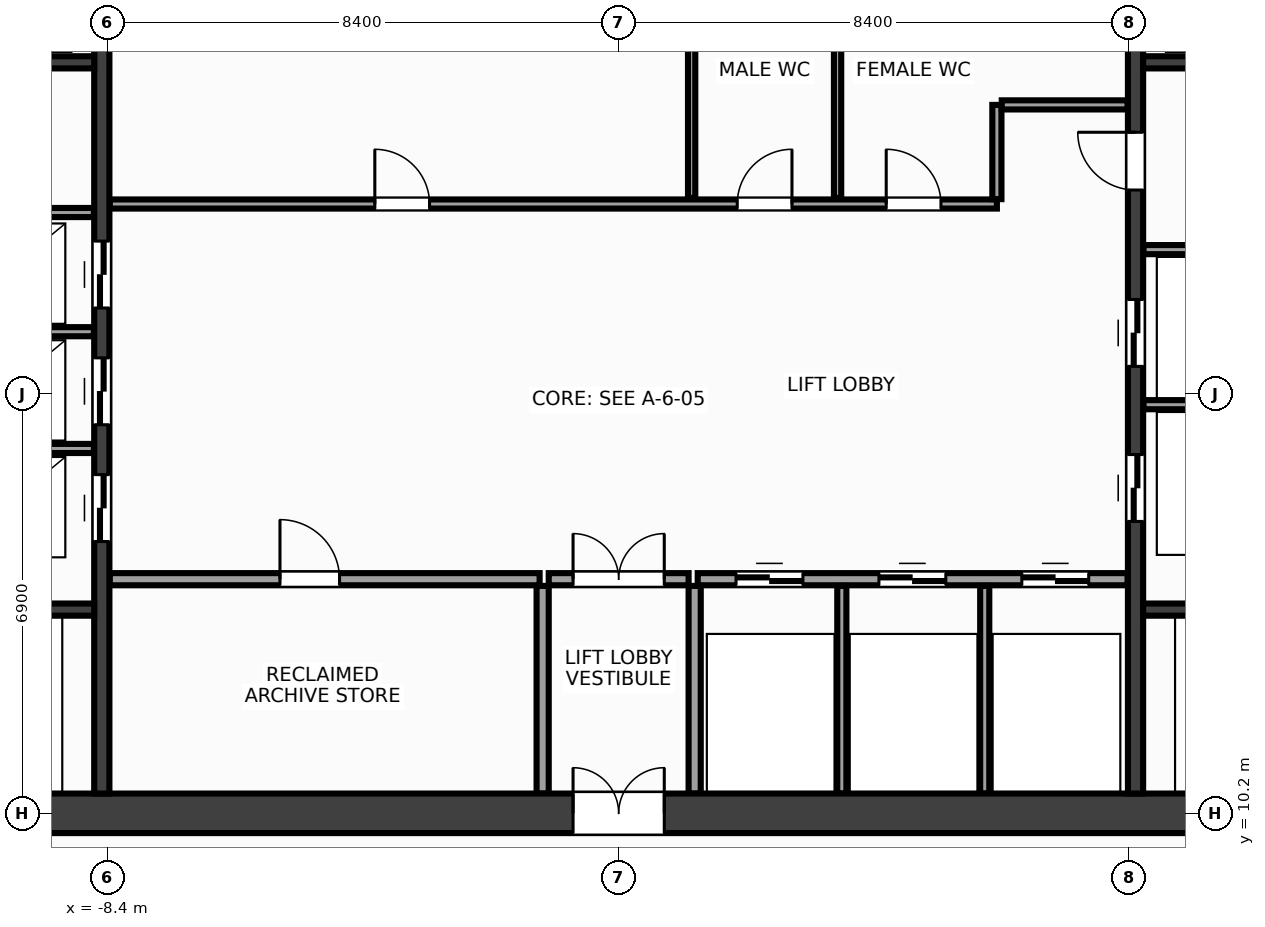
"""IFC4 building model, lengths in metres.
Left out: names, types, materials, properties, quantities, classifications, styles, units other than length and angle.
Written with IfcOpenShell. Run it as: python <this file> out.ifc"""

import sys

from ifc_helpers import new_model, si_unit, direction, frame, frame_2d, origin, place, context, subcontext, project, spatial, rectangle, extrude, source, transform, mapped, element, fill, save


model = new_model("IFC4")
c1 = context("Model", 3, precision=1e-05, world=origin(), true_north=direction((0.0, 1.0)))
c2 = subcontext(c1, "Body", "Model", "MODEL_VIEW")
j1 = project(units=[si_unit("LENGTHUNIT", "METRE"), si_unit("PLANEANGLEUNIT", "RADIAN")], contexts=[c1])
p1 = place(None, origin())
s1 = spatial("IfcSite", under=j1, at=p1, CompositionType="ELEMENT")
p2 = place(p1, origin())
s2 = spatial("IfcBuilding", under=s1, at=p2, CompositionType="ELEMENT")
p3 = place(p2, frame((0.0, 0.0, 131.6)))
s3 = spatial("IfcBuildingStorey", under=s2, at=p3, CompositionType="ELEMENT", Elevation=131.6)
m1 = source(origin(), c2, "Body", "SweptSolid", [
    extrude(rectangle(XDim=31.85, YDim=0.65, at=frame_2d((15.925, 0.0))), origin(), (0.0, 0.0, 1.0), 3.6),
])
p4 = place(p3, frame((-15.925, 10.2, 0.0), z_axis=(0.0, 0.0, 1.0), x_axis=(1.0, 0.0, 0.0)))
e1 = element("IfcWall", 1, at=p4, inside=s3, PredefinedType="SHEAR", context=c2, shape_type="MappedRepresentation", body=[
    mapped(m1, transform((0.0, 0.0, 0.0), x_axis=(1.0, 0.0, 0.0), y_axis=(0.0, 1.0, 0.0), z_axis=(0.0, 0.0, 1.0), scale=1.0)),
])
p5 = place(p4, frame((1.775, 0.0, 0.0)))
e2 = element("IfcOpeningElement", 2, at=p5, cuts=e1, PredefinedType="OPENING", context=c2, shape_type="SweptSolid", body=[
    extrude(rectangle(XDim=1.6, YDim=2.15, at=frame_2d((0.8, 1.075))), frame((0.0, 0.337, 0.0), z_axis=(0.0, -1.0, 0.0), x_axis=(1.0, 0.0, 0.0)), (0.0, 0.0, 1.0), 0.674),
])
p6 = place(p4, frame((28.475, 0.0, 0.0)))
e3 = element("IfcOpeningElement", 3, at=p6, cuts=e1, PredefinedType="OPENING", context=c2, shape_type="SweptSolid", body=[
    extrude(rectangle(XDim=1.6, YDim=2.15, at=frame_2d((0.8, 1.075))), frame((0.0, 0.337, 0.0), z_axis=(0.0, -1.0, 0.0), x_axis=(1.0, 0.0, 0.0)), (0.0, 0.0, 1.0), 0.674),
])
p7 = place(p4, frame((15.175, 0.0, 0.0)))
e4 = element("IfcOpeningElement", 4, at=p7, cuts=e1, PredefinedType="OPENING", context=c2, shape_type="SweptSolid", body=[
    extrude(rectangle(XDim=1.5, YDim=2.2, at=frame_2d((0.75, 1.1))), frame((0.0, 0.337, 0.0), z_axis=(0.0, -1.0, 0.0), x_axis=(1.0, 0.0, 0.0)), (0.0, 0.0, 1.0), 0.674),
])
m2 = source(origin(), c2, "Body", "SweptSolid", [
    extrude(rectangle(XDim=12.95, YDim=0.25, at=frame_2d((6.475, 0.0))), origin(), (0.0, 0.0, 1.0), 3.6),
])
p8 = place(p3, frame((-8.5, 10.525, 0.0), z_axis=(0.0, 0.0, 1.0), x_axis=(0.0, 1.0, 0.0)))
e5 = element("IfcWall", 5, at=p8, inside=s3, PredefinedType="SHEAR", context=c2, shape_type="MappedRepresentation", body=[
    mapped(m2, transform((0.0, 0.0, 0.0), x_axis=(1.0, 0.0, 0.0), y_axis=(0.0, 1.0, 0.0), z_axis=(0.0, 0.0, 1.0), scale=1.0)),
])
p9 = place(p8, frame((4.145, 0.0, 0.0)))
e6 = element("IfcOpeningElement", 6, at=p9, cuts=e5, PredefinedType="OPENING", context=c2, shape_type="SweptSolid", body=[
    extrude(rectangle(XDim=1.1, YDim=2.15, at=frame_2d((0.55, 1.075))), frame((0.0, 0.137, 0.0), z_axis=(0.0, -1.0, 0.0), x_axis=(1.0, 0.0, 0.0)), (0.0, 0.0, 1.0), 0.274),
])
p10 = place(p8, frame((6.065, 0.0, 0.0)))
e7 = element("IfcOpeningElement", 7, at=p10, cuts=e5, PredefinedType="OPENING", context=c2, shape_type="SweptSolid", body=[
    extrude(rectangle(XDim=1.1, YDim=2.15, at=frame_2d((0.55, 1.075))), frame((0.0, 0.137, 0.0), z_axis=(0.0, -1.0, 0.0), x_axis=(1.0, 0.0, 0.0)), (0.0, 0.0, 1.0), 0.274),
])
p11 = place(p8, frame((7.985, 0.0, 0.0)))
e8 = element("IfcOpeningElement", 8, at=p11, cuts=e5, PredefinedType="OPENING", context=c2, shape_type="SweptSolid", body=[
    extrude(rectangle(XDim=1.1, YDim=2.15, at=frame_2d((0.55, 1.075))), frame((0.0, 0.137, 0.0), z_axis=(0.0, -1.0, 0.0), x_axis=(1.0, 0.0, 0.0)), (0.0, 0.0, 1.0), 0.274),
])
p12 = place(p3, frame((8.5, 10.525, 0.0), z_axis=(0.0, 0.0, 1.0), x_axis=(0.0, 1.0, 0.0)))
e9 = element("IfcWall", 9, at=p12, inside=s3, PredefinedType="SHEAR", context=c2, shape_type="MappedRepresentation", body=[
    mapped(m2, transform((0.0, 0.0, 0.0), x_axis=(1.0, 0.0, 0.0), y_axis=(0.0, 1.0, 0.0), z_axis=(0.0, 0.0, 1.0), scale=1.0)),
])
p13 = place(p12, frame((4.475, 0.0, 0.0)))
e10 = element("IfcOpeningElement", 10, at=p13, cuts=e9, PredefinedType="OPENING", context=c2, shape_type="SweptSolid", body=[
    extrude(rectangle(XDim=1.1, YDim=2.15, at=frame_2d((0.55, 1.075))), frame((0.0, 0.137, 0.0), z_axis=(0.0, -1.0, 0.0), x_axis=(1.0, 0.0, 0.0)), (0.0, 0.0, 1.0), 0.274),
])
p14 = place(p12, frame((7.025, 0.0, 0.0)))
e11 = element("IfcOpeningElement", 11, at=p14, cuts=e9, PredefinedType="OPENING", context=c2, shape_type="SweptSolid", body=[
    extrude(rectangle(XDim=1.1, YDim=2.15, at=frame_2d((0.55, 1.075))), frame((0.0, 0.137, 0.0), z_axis=(0.0, -1.0, 0.0), x_axis=(1.0, 0.0, 0.0)), (0.0, 0.0, 1.0), 0.274),
])
p15 = place(p12, frame((9.925, 0.0, 0.0)))
e12 = element("IfcOpeningElement", 12, at=p15, cuts=e9, PredefinedType="OPENING", context=c2, shape_type="SweptSolid", body=[
    extrude(rectangle(XDim=0.95, YDim=2.15, at=frame_2d((0.475, 1.075))), frame((0.0, 0.137, 0.0), z_axis=(0.0, -1.0, 0.0), x_axis=(1.0, 0.0, 0.0)), (0.0, 0.0, 1.0), 0.274),
])
m3 = source(origin(), c2, "Body", "SweptSolid", [
    extrude(rectangle(XDim=2.825, YDim=0.2, at=frame_2d((1.413, 0.0))), origin(), (0.0, 0.0, 1.0), 3.6),
])
for number, where, z_axis, x_axis in (
    (13, (-11.45, 13.55, 0.0), (0.0, 0.0, 1.0), (1.0, 0.0, 0.0)),
    (14, (8.625, 13.55, 0.0), (0.0, 0.0, 1.0), (1.0, 0.0, 0.0)),
):
    element("IfcWall", number, at=place(p3, frame(where, z_axis=z_axis, x_axis=x_axis)), inside=s3, PredefinedType="SHEAR", context=c2, shape_type="MappedRepresentation", body=[
        mapped(m3, transform((0.0, 0.0, 0.0), x_axis=(1.0, 0.0, 0.0), y_axis=(0.0, 1.0, 0.0), z_axis=(0.0, 0.0, 1.0), scale=1.0)),
    ])
m4 = source(origin(), c2, "Body", "SweptSolid", [
    extrude(rectangle(XDim=3.02, YDim=0.2, at=frame_2d((1.51, 0.0))), origin(), (0.0, 0.0, 1.0), 3.6),
])
for number, where, z_axis, x_axis in (
    (15, (-11.645, 22.55, 0.0), (0.0, 0.0, 1.0), (1.0, 0.0, 0.0)),
    (16, (8.625, 22.55, 0.0), (0.0, 0.0, 1.0), (1.0, 0.0, 0.0)),
):
    element("IfcWall", number, at=place(p3, frame(where, z_axis=z_axis, x_axis=x_axis)), inside=s3, PredefinedType="SHEAR", context=c2, shape_type="MappedRepresentation", body=[
        mapped(m4, transform((0.0, 0.0, 0.0), x_axis=(1.0, 0.0, 0.0), y_axis=(0.0, 1.0, 0.0), z_axis=(0.0, 0.0, 1.0), scale=1.0)),
    ])
m5 = source(origin(), c2, "Body", "SweptSolid", [
    extrude(rectangle(XDim=3.01, YDim=0.15, at=frame_2d((1.505, 0.0))), origin(), (0.0, 0.0, 1.0), 3.38),
])
for number, where, z_axis, x_axis in (
    (17, (-11.64, 16.2, 0.0), (0.0, 0.0, 1.0), (1.0, 0.0, 0.0)),
    (18, (-11.64, 18.12, 0.0), (0.0, 0.0, 1.0), (1.0, 0.0, 0.0)),
    (19, (-11.64, 20.08, 0.0), (0.0, 0.0, 1.0), (1.0, 0.0, 0.0)),
    (20, (8.63, 16.92, 0.0), (0.0, 0.0, 1.0), (1.0, 0.0, 0.0)),
    (21, (8.63, 19.47, 0.0), (0.0, 0.0, 1.0), (1.0, 0.0, 0.0)),
):
    element("IfcWall", number, at=place(p3, frame(where, z_axis=z_axis, x_axis=x_axis)), inside=s3, PredefinedType="PARTITIONING", context=c2, shape_type="MappedRepresentation", body=[
        mapped(m5, transform((0.0, 0.0, 0.0), x_axis=(1.0, 0.0, 0.0), y_axis=(0.0, 1.0, 0.0), z_axis=(0.0, 0.0, 1.0), scale=1.0)),
    ])
m6 = source(origin(), c2, "Body", "SweptSolid", [
    extrude(rectangle(XDim=7.07, YDim=0.2, at=frame_2d((3.535, 0.0))), origin(), (0.0, 0.0, 1.0), 3.38),
])
p16 = place(p3, frame((-8.37, 14.05, 0.0), z_axis=(0.0, 0.0, 1.0), x_axis=(1.0, 0.0, 0.0)))
e22 = element("IfcWall", 22, at=p16, inside=s3, PredefinedType="PARTITIONING", context=c2, shape_type="MappedRepresentation", body=[
    mapped(m6, transform((0.0, 0.0, 0.0), x_axis=(1.0, 0.0, 0.0), y_axis=(0.0, 1.0, 0.0), z_axis=(0.0, 0.0, 1.0), scale=1.0)),
])
p17 = place(p16, frame((2.8, 0.0, 0.0)))
e23 = element("IfcOpeningElement", 23, at=p17, cuts=e22, PredefinedType="OPENING", context=c2, shape_type="SweptSolid", body=[
    extrude(rectangle(XDim=0.98, YDim=2.15, at=frame_2d((0.49, 1.075))), frame((0.0, 0.112, 0.0), z_axis=(0.0, -1.0, 0.0), x_axis=(1.0, 0.0, 0.0)), (0.0, 0.0, 1.0), 0.224),
])
p18 = place(p3, frame((1.3, 14.05, 0.0), z_axis=(0.0, 0.0, 1.0), x_axis=(1.0, 0.0, 0.0)))
e24 = element("IfcWall", 24, at=p18, inside=s3, PredefinedType="PARTITIONING", context=c2, shape_type="MappedRepresentation", body=[
    mapped(m6, transform((0.0, 0.0, 0.0), x_axis=(1.0, 0.0, 0.0), y_axis=(0.0, 1.0, 0.0), z_axis=(0.0, 0.0, 1.0), scale=1.0)),
])
p19 = place(p18, frame((0.63, 0.0, 0.0)))
e25 = element("IfcOpeningElement", 25, at=p19, cuts=e24, PredefinedType="OPENING", context=c2, shape_type="SweptSolid", body=[
    extrude(rectangle(XDim=1.1, YDim=2.15, at=frame_2d((0.55, 1.075))), frame((0.0, 0.112, 0.0), z_axis=(0.0, -1.0, 0.0), x_axis=(1.0, 0.0, 0.0)), (0.0, 0.0, 1.0), 0.224),
])
p20 = place(p18, frame((2.98, 0.0, 0.0)))
e26 = element("IfcOpeningElement", 26, at=p20, cuts=e24, PredefinedType="OPENING", context=c2, shape_type="SweptSolid", body=[
    extrude(rectangle(XDim=1.1, YDim=2.15, at=frame_2d((0.55, 1.075))), frame((0.0, 0.112, 0.0), z_axis=(0.0, -1.0, 0.0), x_axis=(1.0, 0.0, 0.0)), (0.0, 0.0, 1.0), 0.224),
])
p21 = place(p18, frame((5.33, 0.0, 0.0)))
e27 = element("IfcOpeningElement", 27, at=p21, cuts=e24, PredefinedType="OPENING", context=c2, shape_type="SweptSolid", body=[
    extrude(rectangle(XDim=1.1, YDim=2.15, at=frame_2d((0.55, 1.075))), frame((0.0, 0.112, 0.0), z_axis=(0.0, -1.0, 0.0), x_axis=(1.0, 0.0, 0.0)), (0.0, 0.0, 1.0), 0.224),
])
m7 = source(origin(), c2, "Body", "SweptSolid", [
    extrude(rectangle(XDim=3.415, YDim=0.2, at=frame_2d((1.708, 0.0))), origin(), (0.0, 0.0, 1.0), 3.38),
])
for number, where, z_axis, x_axis in (
    (28, (-1.25, 10.525, 0.0), (0.0, 0.0, 1.0), (0.0, 1.0, 0.0)),
    (29, (1.25, 10.525, 0.0), (0.0, 0.0, 1.0), (0.0, 1.0, 0.0)),
):
    element("IfcWall", number, at=place(p3, frame(where, z_axis=z_axis, x_axis=x_axis)), inside=s3, PredefinedType="PARTITIONING", context=c2, shape_type="MappedRepresentation", body=[
        mapped(m7, transform((0.0, 0.0, 0.0), x_axis=(1.0, 0.0, 0.0), y_axis=(0.0, 1.0, 0.0), z_axis=(0.0, 0.0, 1.0), scale=1.0)),
    ])
m8 = source(origin(), c2, "Body", "SweptSolid", [
    extrude(rectangle(XDim=2.3, YDim=0.2, at=frame_2d((1.15, 0.0))), origin(), (0.0, 0.0, 1.0), 3.38),
])
p22 = place(p3, frame((-1.15, 14.05, 0.0), z_axis=(0.0, 0.0, 1.0), x_axis=(1.0, 0.0, 0.0)))
e30 = element("IfcWall", 30, at=p22, inside=s3, PredefinedType="PARTITIONING", context=c2, shape_type="MappedRepresentation", body=[
    mapped(m8, transform((0.0, 0.0, 0.0), x_axis=(1.0, 0.0, 0.0), y_axis=(0.0, 1.0, 0.0), z_axis=(0.0, 0.0, 1.0), scale=1.0)),
])
p23 = place(p22, frame((0.4, 0.0, 0.0)))
e31 = element("IfcOpeningElement", 31, at=p23, cuts=e30, PredefinedType="OPENING", context=c2, shape_type="SweptSolid", body=[
    extrude(rectangle(XDim=1.5, YDim=2.2, at=frame_2d((0.75, 1.1))), frame((0.0, 0.112, 0.0), z_axis=(0.0, -1.0, 0.0), x_axis=(1.0, 0.0, 0.0)), (0.0, 0.0, 1.0), 0.224),
])
m9 = source(origin(), c2, "Body", "SweptSolid", [
    extrude(rectangle(XDim=14.59, YDim=0.15, at=frame_2d((7.295, 0.0))), origin(), (0.0, 0.0, 1.0), 3.38),
])
p24 = place(p3, frame((-8.37, 20.22, 0.0), z_axis=(0.0, 0.0, 1.0), x_axis=(1.0, 0.0, 0.0)))
e32 = element("IfcWall", 32, at=p24, inside=s3, PredefinedType="PARTITIONING", context=c2, shape_type="MappedRepresentation", body=[
    mapped(m9, transform((0.0, 0.0, 0.0), x_axis=(1.0, 0.0, 0.0), y_axis=(0.0, 1.0, 0.0), z_axis=(0.0, 0.0, 1.0), scale=1.0)),
])
p25 = place(p24, frame((4.36, 0.0, 0.0)))
e33 = element("IfcOpeningElement", 33, at=p25, cuts=e32, PredefinedType="OPENING", context=c2, shape_type="SweptSolid", body=[
    extrude(rectangle(XDim=0.9, YDim=2.15, at=frame_2d((0.45, 1.075))), frame((0.0, 0.087, 0.0), z_axis=(0.0, -1.0, 0.0), x_axis=(1.0, 0.0, 0.0)), (0.0, 0.0, 1.0), 0.174),
])
p26 = place(p24, frame((10.32, 0.0, 0.0)))
e34 = element("IfcOpeningElement", 34, at=p26, cuts=e32, PredefinedType="OPENING", context=c2, shape_type="SweptSolid", body=[
    extrude(rectangle(XDim=0.9, YDim=2.15, at=frame_2d((0.45, 1.075))), frame((0.0, 0.087, 0.0), z_axis=(0.0, -1.0, 0.0), x_axis=(1.0, 0.0, 0.0)), (0.0, 0.0, 1.0), 0.174),
])
p27 = place(p24, frame((12.77, 0.0, 0.0)))
e35 = element("IfcOpeningElement", 35, at=p27, cuts=e32, PredefinedType="OPENING", context=c2, shape_type="SweptSolid", body=[
    extrude(rectangle(XDim=0.9, YDim=2.15, at=frame_2d((0.45, 1.075))), frame((0.0, 0.087, 0.0), z_axis=(0.0, -1.0, 0.0), x_axis=(1.0, 0.0, 0.0)), (0.0, 0.0, 1.0), 0.174),
])
m10 = source(origin(), c2, "Body", "SweptSolid", [
    extrude(rectangle(XDim=1.55, YDim=0.15, at=frame_2d((0.775, 0.0))), origin(), (0.0, 0.0, 1.0), 3.38),
])
p28 = place(p3, frame((6.22, 20.3, 0.0), z_axis=(0.0, 0.0, 1.0), x_axis=(0.0, 1.0, 0.0)))
e36 = element("IfcWall", 36, at=p28, inside=s3, PredefinedType="PARTITIONING", context=c2, shape_type="MappedRepresentation", body=[
    mapped(m10, transform((0.0, 0.0, 0.0), x_axis=(1.0, 0.0, 0.0), y_axis=(0.0, 1.0, 0.0), z_axis=(0.0, 0.0, 1.0), scale=1.0)),
])
m11 = source(origin(), c2, "Body", "SweptSolid", [
    extrude(rectangle(XDim=2.07, YDim=0.15, at=frame_2d((1.035, 0.0))), origin(), (0.0, 0.0, 1.0), 3.38),
])
p29 = place(p3, frame((6.3, 21.85, 0.0), z_axis=(0.0, 0.0, 1.0), x_axis=(1.0, 0.0, 0.0)))
e37 = element("IfcWall", 37, at=p29, inside=s3, PredefinedType="PARTITIONING", context=c2, shape_type="MappedRepresentation", body=[
    mapped(m11, transform((0.0, 0.0, 0.0), x_axis=(1.0, 0.0, 0.0), y_axis=(0.0, 1.0, 0.0), z_axis=(0.0, 0.0, 1.0), scale=1.0)),
])
m12 = source(origin(), c2, "Body", "SweptSolid", [
    extrude(rectangle(XDim=3.415, YDim=0.15, at=frame_2d((1.708, 0.0))), origin(), (0.0, 0.0, 1.0), 3.38),
])
for number, where, z_axis, x_axis in (
    (38, (3.67, 10.525, 0.0), (0.0, 0.0, 1.0), (0.0, 1.0, 0.0)),
    (39, (6.02, 10.525, 0.0), (0.0, 0.0, 1.0), (0.0, 1.0, 0.0)),
):
    element("IfcWall", number, at=place(p3, frame(where, z_axis=z_axis, x_axis=x_axis)), inside=s3, PredefinedType="PARTITIONING", context=c2, shape_type="MappedRepresentation", body=[
        mapped(m12, transform((0.0, 0.0, 0.0), x_axis=(1.0, 0.0, 0.0), y_axis=(0.0, 1.0, 0.0), z_axis=(0.0, 0.0, 1.0), scale=1.0)),
    ])
m13 = source(origin(), c2, "Body", "SweptSolid", [
    extrude(rectangle(XDim=3.115, YDim=0.12, at=frame_2d((1.558, 0.0))), origin(), (0.0, 0.0, 1.0), 3.38),
])
for number, where, z_axis, x_axis in (
    (40, (1.2, 20.32, 0.0), (0.0, 0.0, 1.0), (0.0, 1.0, 0.0)),
    (41, (3.6, 20.32, 0.0), (0.0, 0.0, 1.0), (0.0, 1.0, 0.0)),
):
    element("IfcWall", number, at=place(p3, frame(where, z_axis=z_axis, x_axis=x_axis)), inside=s3, PredefinedType="PARTITIONING", context=c2, shape_type="MappedRepresentation", body=[
        mapped(m13, transform((0.0, 0.0, 0.0), x_axis=(1.0, 0.0, 0.0), y_axis=(0.0, 1.0, 0.0), z_axis=(0.0, 0.0, 1.0), scale=1.0)),
    ])
m14 = source(origin(), c2, "Body", "SweptSolid", [
    extrude(rectangle(XDim=1.1, YDim=2.15, at=frame_2d((0.55, 1.075))), frame((0.0, 0.025, 0.0), z_axis=(0.0, -1.0, 0.0), x_axis=(1.0, 0.0, 0.0)), (0.0, 0.0, 1.0), 0.05),
])
p30 = place(p9, origin())
e42 = element("IfcDoor", 42, at=p30, inside=s3, OperationType="DOUBLE_DOOR_SLIDING", PredefinedType="DOOR", context=c2, shape_type="MappedRepresentation", body=[
    mapped(m14, transform((0.0, 0.0, 0.0), x_axis=(1.0, 0.0, 0.0), y_axis=(0.0, 1.0, 0.0), z_axis=(0.0, 0.0, 1.0), scale=1.0)),
])
fill(e6, e42)
p31 = place(p10, origin())
e43 = element("IfcDoor", 43, at=p31, inside=s3, OperationType="DOUBLE_DOOR_SLIDING", PredefinedType="DOOR", context=c2, shape_type="MappedRepresentation", body=[
    mapped(m14, transform((0.0, 0.0, 0.0), x_axis=(1.0, 0.0, 0.0), y_axis=(0.0, 1.0, 0.0), z_axis=(0.0, 0.0, 1.0), scale=1.0)),
])
fill(e7, e43)
p32 = place(p11, origin())
e44 = element("IfcDoor", 44, at=p32, inside=s3, OperationType="DOUBLE_DOOR_SLIDING", PredefinedType="DOOR", context=c2, shape_type="MappedRepresentation", body=[
    mapped(m14, transform((0.0, 0.0, 0.0), x_axis=(1.0, 0.0, 0.0), y_axis=(0.0, 1.0, 0.0), z_axis=(0.0, 0.0, 1.0), scale=1.0)),
])
fill(e8, e44)
p33 = place(p13, origin())
e45 = element("IfcDoor", 45, at=p33, inside=s3, OperationType="DOUBLE_DOOR_SLIDING", PredefinedType="DOOR", context=c2, shape_type="MappedRepresentation", body=[
    mapped(m14, transform((0.0, 0.0, 0.0), x_axis=(1.0, 0.0, 0.0), y_axis=(0.0, 1.0, 0.0), z_axis=(0.0, 0.0, 1.0), scale=1.0)),
])
fill(e10, e45)
p34 = place(p14, origin())
e46 = element("IfcDoor", 46, at=p34, inside=s3, OperationType="DOUBLE_DOOR_SLIDING", PredefinedType="DOOR", context=c2, shape_type="MappedRepresentation", body=[
    mapped(m14, transform((0.0, 0.0, 0.0), x_axis=(1.0, 0.0, 0.0), y_axis=(0.0, 1.0, 0.0), z_axis=(0.0, 0.0, 1.0), scale=1.0)),
])
fill(e11, e46)
m15 = source(origin(), c2, "Body", "SweptSolid", [
    extrude(rectangle(XDim=0.95, YDim=2.15, at=frame_2d((0.475, 1.075))), frame((0.0, 0.025, 0.0), z_axis=(0.0, -1.0, 0.0), x_axis=(1.0, 0.0, 0.0)), (0.0, 0.0, 1.0), 0.05),
])
p35 = place(p15, origin())
e47 = element("IfcDoor", 47, at=p35, inside=s3, OperationType="SINGLE_SWING_RIGHT", PredefinedType="DOOR", context=c2, shape_type="MappedRepresentation", body=[
    mapped(m15, transform((0.0, 0.0, 0.0), x_axis=(1.0, 0.0, 0.0), y_axis=(0.0, 1.0, 0.0), z_axis=(0.0, 0.0, 1.0), scale=1.0)),
])
fill(e12, e47)
m16 = source(origin(), c2, "Body", "SweptSolid", [
    extrude(rectangle(XDim=0.98, YDim=2.15, at=frame_2d((0.49, 1.075))), frame((0.0, 0.025, 0.0), z_axis=(0.0, -1.0, 0.0), x_axis=(1.0, 0.0, 0.0)), (0.0, 0.0, 1.0), 0.05),
])
p36 = place(p17, origin())
e48 = element("IfcDoor", 48, at=p36, inside=s3, OperationType="SINGLE_SWING_LEFT", PredefinedType="DOOR", context=c2, shape_type="MappedRepresentation", body=[
    mapped(m16, transform((0.0, 0.0, 0.0), x_axis=(1.0, 0.0, 0.0), y_axis=(0.0, 1.0, 0.0), z_axis=(0.0, 0.0, 1.0), scale=1.0)),
])
fill(e23, e48)
p37 = place(p19, origin())
e49 = element("IfcDoor", 49, at=p37, inside=s3, OperationType="DOUBLE_DOOR_SLIDING", PredefinedType="DOOR", context=c2, shape_type="MappedRepresentation", body=[
    mapped(m14, transform((0.0, 0.0, 0.0), x_axis=(1.0, 0.0, 0.0), y_axis=(0.0, 1.0, 0.0), z_axis=(0.0, 0.0, 1.0), scale=1.0)),
])
fill(e25, e49)
p38 = place(p20, origin())
e50 = element("IfcDoor", 50, at=p38, inside=s3, OperationType="DOUBLE_DOOR_SLIDING", PredefinedType="DOOR", context=c2, shape_type="MappedRepresentation", body=[
    mapped(m14, transform((0.0, 0.0, 0.0), x_axis=(1.0, 0.0, 0.0), y_axis=(0.0, 1.0, 0.0), z_axis=(0.0, 0.0, 1.0), scale=1.0)),
])
fill(e26, e50)
p39 = place(p21, origin())
e51 = element("IfcDoor", 51, at=p39, inside=s3, OperationType="DOUBLE_DOOR_SLIDING", PredefinedType="DOOR", context=c2, shape_type="MappedRepresentation", body=[
    mapped(m14, transform((0.0, 0.0, 0.0), x_axis=(1.0, 0.0, 0.0), y_axis=(0.0, 1.0, 0.0), z_axis=(0.0, 0.0, 1.0), scale=1.0)),
])
fill(e27, e51)
m17 = source(origin(), c2, "Body", "SweptSolid", [
    extrude(rectangle(XDim=1.5, YDim=2.2, at=frame_2d((0.75, 1.1))), frame((0.0, 0.025, 0.0), z_axis=(0.0, -1.0, 0.0), x_axis=(1.0, 0.0, 0.0)), (0.0, 0.0, 1.0), 0.05),
])
p40 = place(p23, origin())
e52 = element("IfcDoor", 52, at=p40, inside=s3, OperationType="DOUBLE_DOOR_SINGLE_SWING", PredefinedType="DOOR", context=c2, shape_type="MappedRepresentation", body=[
    mapped(m17, transform((0.0, 0.0, 0.0), x_axis=(1.0, 0.0, 0.0), y_axis=(0.0, 1.0, 0.0), z_axis=(0.0, 0.0, 1.0), scale=1.0)),
])
fill(e31, e52)
p41 = place(p7, origin())
e53 = element("IfcDoor", 53, at=p41, inside=s3, OperationType="DOUBLE_DOOR_SINGLE_SWING", PredefinedType="DOOR", context=c2, shape_type="MappedRepresentation", body=[
    mapped(m17, transform((0.0, 0.0, 0.0), x_axis=(1.0, 0.0, 0.0), y_axis=(0.0, 1.0, 0.0), z_axis=(0.0, 0.0, 1.0), scale=1.0)),
])
fill(e4, e53)
m18 = source(origin(), c2, "Body", "SweptSolid", [
    extrude(rectangle(XDim=0.9, YDim=2.15, at=frame_2d((0.45, 1.075))), frame((0.0, 0.025, 0.0), z_axis=(0.0, -1.0, 0.0), x_axis=(1.0, 0.0, 0.0)), (0.0, 0.0, 1.0), 0.05),
])
p42 = place(p25, origin())
e54 = element("IfcDoor", 54, at=p42, inside=s3, OperationType="SINGLE_SWING_LEFT", PredefinedType="DOOR", context=c2, shape_type="MappedRepresentation", body=[
    mapped(m18, transform((0.0, 0.0, 0.0), x_axis=(1.0, 0.0, 0.0), y_axis=(0.0, 1.0, 0.0), z_axis=(0.0, 0.0, 1.0), scale=1.0)),
])
fill(e33, e54)
p43 = place(p26, origin())
e55 = element("IfcDoor", 55, at=p43, inside=s3, OperationType="SINGLE_SWING_RIGHT", PredefinedType="DOOR", context=c2, shape_type="MappedRepresentation", body=[
    mapped(m18, transform((0.0, 0.0, 0.0), x_axis=(1.0, 0.0, 0.0), y_axis=(0.0, 1.0, 0.0), z_axis=(0.0, 0.0, 1.0), scale=1.0)),
])
fill(e34, e55)
p44 = place(p27, origin())
e56 = element("IfcDoor", 56, at=p44, inside=s3, OperationType="SINGLE_SWING_LEFT", PredefinedType="DOOR", context=c2, shape_type="MappedRepresentation", body=[
    mapped(m18, transform((0.0, 0.0, 0.0), x_axis=(1.0, 0.0, 0.0), y_axis=(0.0, 1.0, 0.0), z_axis=(0.0, 0.0, 1.0), scale=1.0)),
])
fill(e35, e56)
save(model, sys.argv[1])
